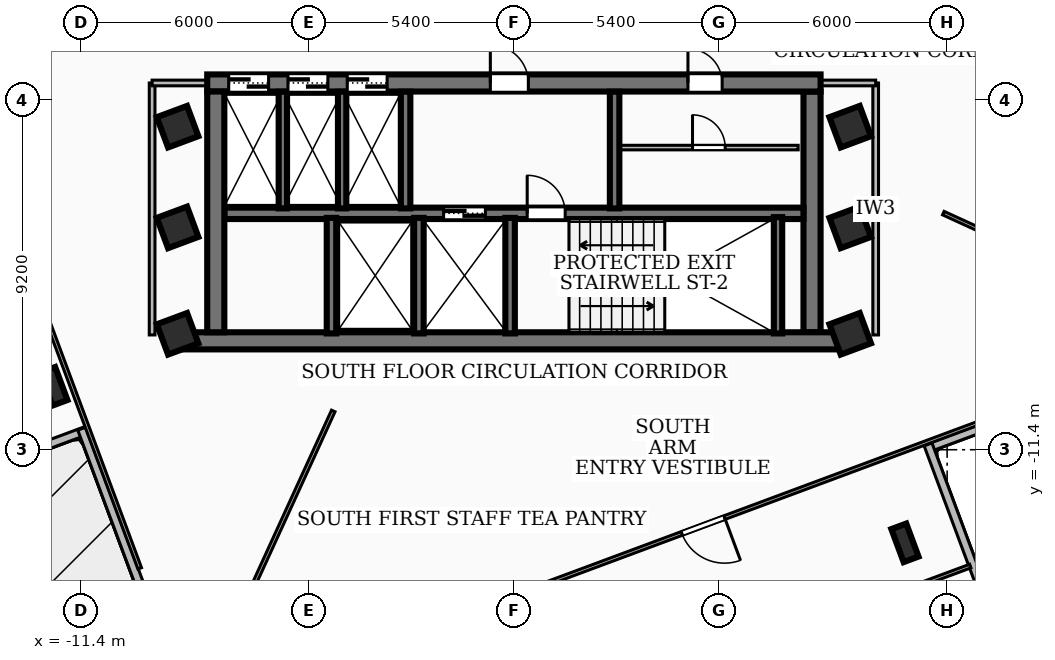
"""IFC4 building model, lengths in metres.
Left out: names, types, materials, properties, quantities, classifications, styles, units other than length and angle.
Written with IfcOpenShell. Run it as: python <this file> out.ifc"""

import sys

from ifc_helpers import new_model, si_unit, direction, frame, frame_2d, origin, origin_2d, place, context, subcontext, project, spatial, rectangle, i_section, extrude, element, fill, save


model = new_model("IFC4")
c1 = context("Model", 3, precision=1e-05, world=origin(), true_north=direction((0.0, 1.0)))
c2 = subcontext(c1, "Body", "Model", "MODEL_VIEW")
j1 = project(units=[si_unit("LENGTHUNIT", "METRE"), si_unit("PLANEANGLEUNIT", "RADIAN")], contexts=[c1])
p1 = place(None, origin())
s1 = spatial("IfcSite", under=j1, at=p1, CompositionType="ELEMENT")
p2 = place(p1, origin())
s2 = spatial("IfcBuilding", under=s1, at=p2, CompositionType="ELEMENT")
p3 = place(p2, frame((0.0, 0.0, 170.28)))
s3 = spatial("IfcBuildingStorey", under=s2, at=p3, CompositionType="ELEMENT", Elevation=170.28)
p4 = place(p3, frame((8.78, -8.535, 0.0), z_axis=(0.0, 0.0, 1.0), x_axis=(-1.0, 0.0, 0.0)))
e1 = element("IfcWall", 1, at=p4, inside=s3, PredefinedType="SHEAR", context=c2, shape_type="SweptSolid", body=[
    extrude(rectangle(XDim=17.56, YDim=0.45, at=frame_2d((8.78, 0.0))), origin(), (0.0, 0.0, 1.0), 3.34),
])
p5 = place(p3, frame((-8.07, -1.75, 0.0), z_axis=(0.0, 0.0, 1.0), x_axis=(1.0, 0.0, 0.0)))
e2 = element("IfcWall", 2, at=p5, inside=s3, PredefinedType="SHEAR", context=c2, shape_type="SweptSolid", body=[
    extrude(rectangle(XDim=16.14, YDim=0.45, at=frame_2d((8.07, 0.0))), origin(), (0.0, 0.0, 1.0), 3.34),
])
p6 = place(p5, frame((7.45, 0.0, 0.0)))
e3 = element("IfcOpeningElement", 3, at=p6, cuts=e2, PredefinedType="OPENING", context=c2, shape_type="SweptSolid", body=[
    extrude(rectangle(XDim=1.0, YDim=2.1, at=frame_2d((0.5, 1.05))), frame((0.0, 0.235, 0.0), z_axis=(0.0, -1.0, 0.0), x_axis=(1.0, 0.0, 0.0)), (0.0, 0.0, 1.0), 0.47),
])
p7 = place(p5, frame((12.65, 0.0, 0.0)))
e4 = element("IfcOpeningElement", 4, at=p7, cuts=e2, PredefinedType="OPENING", context=c2, shape_type="SweptSolid", body=[
    extrude(rectangle(XDim=0.9, YDim=2.06, at=frame_2d((0.45, 1.03))), frame((0.0, 0.235, 0.0), z_axis=(0.0, -1.0, 0.0), x_axis=(1.0, 0.0, 0.0)), (0.0, 0.0, 1.0), 0.47),
])
p8 = place(p5, frame((0.565, 0.0, 0.0)))
e5 = element("IfcOpeningElement", 5, at=p8, cuts=e2, PredefinedType="OPENING", context=c2, shape_type="SweptSolid", body=[
    extrude(rectangle(XDim=1.05, YDim=2.15, at=frame_2d((0.525, 1.075))), frame((0.0, 0.235, 0.0), z_axis=(0.0, -1.0, 0.0), x_axis=(1.0, 0.0, 0.0)), (0.0, 0.0, 1.0), 0.47),
])
p9 = place(p5, frame((2.125, 0.0, 0.0)))
e6 = element("IfcOpeningElement", 6, at=p9, cuts=e2, PredefinedType="OPENING", context=c2, shape_type="SweptSolid", body=[
    extrude(rectangle(XDim=1.05, YDim=2.15, at=frame_2d((0.525, 1.075))), frame((0.0, 0.235, 0.0), z_axis=(0.0, -1.0, 0.0), x_axis=(1.0, 0.0, 0.0)), (0.0, 0.0, 1.0), 0.47),
])
p10 = place(p5, frame((3.685, 0.0, 0.0)))
e7 = element("IfcOpeningElement", 7, at=p10, cuts=e2, PredefinedType="OPENING", context=c2, shape_type="SweptSolid", body=[
    extrude(rectangle(XDim=1.05, YDim=2.15, at=frame_2d((0.525, 1.075))), frame((0.0, 0.235, 0.0), z_axis=(0.0, -1.0, 0.0), x_axis=(1.0, 0.0, 0.0)), (0.0, 0.0, 1.0), 0.47),
])
for number, where, z_axis, x_axis in (
    (8, (-7.845, -8.31, 0.0), (0.0, 0.0, 1.0), (0.0, 1.0, 0.0)),
    (9, (7.845, -1.975, 0.0), (0.0, 0.0, 1.0), (0.0, -1.0, 0.0)),
):
    element("IfcWall", number, at=place(p3, frame(where, z_axis=z_axis, x_axis=x_axis)), inside=s3, PredefinedType="SHEAR", context=c2, shape_type="SweptSolid", body=[
        extrude(rectangle(XDim=6.335, YDim=0.45, at=frame_2d((3.167, 0.0))), origin(), (0.0, 0.0, 1.0), 3.34),
    ])
p11 = place(p3, frame((-7.62, -5.18, 0.0), z_axis=(0.0, 0.0, 1.0), x_axis=(1.0, 0.0, 0.0)))
e10 = element("IfcWall", 10, at=p11, inside=s3, PredefinedType="SOLIDWALL", context=c2, shape_type="SweptSolid", body=[
    extrude(rectangle(XDim=15.24, YDim=0.3, at=frame_2d((7.62, 0.0))), origin(), (0.0, 0.0, 1.0), 3.34),
])
p12 = place(p11, frame((5.77, 0.0, 0.0)))
e11 = element("IfcOpeningElement", 11, at=p12, cuts=e10, PredefinedType="OPENING", context=c2, shape_type="SweptSolid", body=[
    extrude(rectangle(XDim=1.1, YDim=2.15, at=frame_2d((0.55, 1.075))), frame((0.0, 0.16, 0.0), z_axis=(0.0, -1.0, 0.0), x_axis=(1.0, 0.0, 0.0)), (0.0, 0.0, 1.0), 0.32),
])
p13 = place(p11, frame((7.97, 0.0, 0.0)))
e12 = element("IfcOpeningElement", 12, at=p13, cuts=e10, PredefinedType="OPENING", context=c2, shape_type="SweptSolid", body=[
    extrude(rectangle(XDim=1.0, YDim=2.1, at=frame_2d((0.5, 1.05))), frame((0.0, 0.16, 0.0), z_axis=(0.0, -1.0, 0.0), x_axis=(1.0, 0.0, 0.0)), (0.0, 0.0, 1.0), 0.32),
])
p14 = place(p3, frame((6.95, -8.34, 0.0), z_axis=(0.0, 0.0, 1.0), x_axis=(0.0, 1.0, 0.0)))
e13 = element("IfcWall", 13, at=p14, inside=s3, PredefinedType="SOLIDWALL", context=c2, shape_type="SweptSolid", body=[
    extrude(rectangle(XDim=3.06, YDim=0.22, at=frame_2d((1.53, 0.0))), origin(), (0.0, 0.0, 1.0), 3.34),
])
for number, where, z_axis, x_axis in (
    (14, (-0.1, -8.34, 0.0), (0.0, 0.0, 1.0), (0.0, 1.0, 0.0)),
    (15, (-2.5, -8.34, 0.0), (0.0, 0.0, 1.0), (0.0, 1.0, 0.0)),
    (16, (-4.8, -8.34, 0.0), (0.0, 0.0, 1.0), (0.0, 1.0, 0.0)),
):
    element("IfcWall", number, at=place(p3, frame(where, z_axis=z_axis, x_axis=x_axis)), inside=s3, PredefinedType="SOLIDWALL", context=c2, shape_type="SweptSolid", body=[
        extrude(rectangle(XDim=3.04, YDim=0.25, at=frame_2d((1.52, 0.0))), origin(), (0.0, 0.0, 1.0), 3.34),
    ])
for number, where, z_axis, x_axis in (
    (17, (-2.85, -5.05, 0.0), (0.0, 0.0, 1.0), (0.0, 1.0, 0.0)),
    (18, (2.65, -5.05, 0.0), (0.0, 0.0, 1.0), (0.0, 1.0, 0.0)),
):
    element("IfcWall", number, at=place(p3, frame(where, z_axis=z_axis, x_axis=x_axis)), inside=s3, PredefinedType="SOLIDWALL", context=c2, shape_type="SweptSolid", body=[
        extrude(rectangle(XDim=3.07, YDim=0.25, at=frame_2d((1.535, 0.0))), origin(), (0.0, 0.0, 1.0), 3.34),
    ])
for number, where, z_axis, x_axis in (
    (19, (-6.08, -5.05, 0.0), (0.0, 0.0, 1.0), (0.0, 1.0, 0.0)),
    (20, (-4.52, -5.05, 0.0), (0.0, 0.0, 1.0), (0.0, 1.0, 0.0)),
):
    element("IfcWall", number, at=place(p3, frame(where, z_axis=z_axis, x_axis=x_axis)), inside=s3, PredefinedType="SOLIDWALL", context=c2, shape_type="SweptSolid", body=[
        extrude(rectangle(XDim=3.07, YDim=0.22, at=frame_2d((1.535, 0.0))), origin(), (0.0, 0.0, 1.0), 3.34),
    ])
for number, where, z_axis, x_axis in (
    (21, (-8.85, -5.55, 0.0), (0.0, 0.0, 1.0), (0.937, 0.349, 0.0)),
    (22, (-8.85, -2.9, 0.0), (0.0, 0.0, 1.0), (0.937, 0.349, 0.0)),
    (23, (8.85, -5.55, 0.0), (0.0, 0.0, 1.0), (0.937, 0.349, 0.0)),
    (24, (8.85, -2.9, 0.0), (0.0, 0.0, 1.0), (0.937, 0.349, 0.0)),
    (25, (8.85, -8.35, 0.0), (0.0, 0.0, 1.0), (0.937, 0.349, 0.0)),
    (26, (-8.85, -8.35, 0.0), (0.0, 0.0, 1.0), (0.937, 0.349, 0.0)),
):
    element("IfcColumn", number, at=place(p3, frame(where, z_axis=z_axis, x_axis=x_axis)), inside=s3, PredefinedType="COLUMN", context=c2, shape_type="SweptSolid", body=[
        extrude(rectangle(XDim=0.85, YDim=0.85, at=origin_2d()), origin(), (0.0, 0.0, 1.0), 3.6),
    ])
for number, where, z_axis, x_axis in (
    (27, (-12.106, -9.731, 0.0), (0.0, 0.0, 1.0), (0.937, 0.349, 0.0)),
    (28, (10.29, -13.85, 0.0), (0.0, 0.0, 1.0), (0.937, 0.349, 0.0)),
):
    element("IfcColumn", number, at=place(p3, frame(where, z_axis=z_axis, x_axis=x_axis)), inside=s3, PredefinedType="COLUMN", context=c2, shape_type="SweptSolid", body=[
        extrude(i_section(OverallWidth=0.418, OverallDepth=0.927, WebThickness=0.019, FlangeThickness=0.032, at=origin_2d()), origin(), (0.0, 0.0, 1.0), 3.6),
    ])
p15 = place(p3, frame((-11.26, -10.898, 0.0), z_axis=(0.0, 0.0, 1.0), x_axis=(-0.937248687931, -0.348661579431, 0.0)))
e29 = element("IfcWall", 29, at=p15, inside=s3, PredefinedType="SOLIDWALL", context=c2, shape_type="SweptSolid", body=[
    extrude(rectangle(XDim=9.057, YDim=0.22, at=frame_2d((4.529, 0.0))), origin(), (0.0, 0.0, 1.0), 2.72),
])
p16 = place(p15, frame((4.4, 0.0, 0.0)))
e30 = element("IfcOpeningElement", 30, at=p16, cuts=e29, PredefinedType="OPENING", context=c2, shape_type="SweptSolid", body=[
    extrude(rectangle(XDim=1.1, YDim=2.1, at=frame_2d((0.55, 1.05))), frame((0.0, 0.12, 0.0), z_axis=(0.0, -1.0, 0.0), x_axis=(1.0, 0.0, 0.0)), (0.0, 0.0, 1.0), 0.24),
])
p17 = place(p3, frame((17.181, -9.016, 0.0), z_axis=(0.0, 0.0, 1.0), x_axis=(-0.937216908499, -0.34874699486, 0.0)))
e31 = element("IfcWall", 31, at=p17, inside=s3, PredefinedType="SOLIDWALL", context=c2, shape_type="SweptSolid", body=[
    extrude(rectangle(XDim=6.758, YDim=0.22, at=frame_2d((3.379, 0.0))), origin(), (0.0, 0.0, 1.0), 3.34),
])
p18 = place(p3, frame((10.898, -11.26, 0.0), z_axis=(0.0, 0.0, 1.0), x_axis=(0.348636078187, -0.937258174137, 0.0)))
e32 = element("IfcWall", 32, at=p18, inside=s3, PredefinedType="SOLIDWALL", context=c2, shape_type="SweptSolid", body=[
    extrude(rectangle(XDim=7.458, YDim=0.22, at=frame_2d((3.729, 0.0))), origin(), (0.0, 0.0, 1.0), 3.34),
])
p19 = place(p3, frame((-9.016, -17.181, 0.0), z_axis=(0.0, 0.0, 1.0), x_axis=(-0.34874699486, 0.937216908499, 0.0)))
e33 = element("IfcWall", 33, at=p19, inside=s3, PredefinedType="SOLIDWALL", context=c2, shape_type="SweptSolid", body=[
    extrude(rectangle(XDim=6.758, YDim=0.22, at=frame_2d((3.379, 0.0))), origin(), (0.0, 0.0, 1.0), 2.72),
])
p20 = place(p3, frame((2.8, -3.45, 0.0), z_axis=(0.0, 0.0, 1.0), x_axis=(1.0, 0.0, 0.0)))
e34 = element("IfcWall", 34, at=p20, inside=s3, PredefinedType="PARTITIONING", context=c2, shape_type="SweptSolid", body=[
    extrude(rectangle(XDim=4.68, YDim=0.12, at=frame_2d((2.34, 0.0))), origin(), (0.0, 0.0, 1.0), 3.34),
])
p21 = place(p20, frame((1.9, 0.0, 0.0)))
e35 = element("IfcOpeningElement", 35, at=p21, cuts=e34, PredefinedType="OPENING", context=c2, shape_type="SweptSolid", body=[
    extrude(rectangle(XDim=0.86, YDim=2.04, at=frame_2d((0.43, 1.02))), frame((0.0, 0.07, 0.0), z_axis=(0.0, -1.0, 0.0), x_axis=(1.0, 0.0, 0.0)), (0.0, 0.0, 1.0), 0.14),
])
p22 = place(p3, frame((-9.52, -8.38, 0.0), z_axis=(0.0, 0.0, 1.0), x_axis=(0.0, 1.0, 0.0)))
e36 = element("IfcWall", 36, at=p22, inside=s3, PredefinedType="PARTITIONING", context=c2, shape_type="SweptSolid", body=[
    extrude(rectangle(XDim=6.63, YDim=0.15, at=frame_2d((3.315, 0.0))), origin(), (0.0, 0.0, 1.0), 2.644),
])
p23 = place(p3, frame((-7.85, -1.75, 0.0), z_axis=(0.0, 0.0, 1.0), x_axis=(-1.0, 0.0, 0.0)))
e37 = element("IfcWall", 37, at=p23, inside=s3, PredefinedType="PARTITIONING", context=c2, shape_type="SweptSolid", body=[
    extrude(rectangle(XDim=1.67, YDim=0.15, at=frame_2d((0.835, 0.0))), origin(), (0.0, 0.0, 1.0), 2.57),
])
p24 = place(p3, frame((9.52, -8.38, 0.0), z_axis=(0.0, 0.0, 1.0), x_axis=(0.0, 1.0, 0.0)))
e38 = element("IfcWall", 38, at=p24, inside=s3, PredefinedType="PARTITIONING", context=c2, shape_type="SweptSolid", body=[
    extrude(rectangle(XDim=6.63, YDim=0.15, at=frame_2d((3.315, 0.0))), origin(), (0.0, 0.0, 1.0), 3.34),
])
p25 = place(p3, frame((7.85, -1.75, 0.0), z_axis=(0.0, 0.0, 1.0), x_axis=(1.0, 0.0, 0.0)))
e39 = element("IfcWall", 39, at=p25, inside=s3, PredefinedType="PARTITIONING", context=c2, shape_type="SweptSolid", body=[
    extrude(rectangle(XDim=1.67, YDim=0.15, at=frame_2d((0.835, 0.0))), origin(), (0.0, 0.0, 1.0), 2.57),
])
p26 = place(p3, frame((-4.753, -10.38, 0.0), z_axis=(0.0, 0.0, 1.0), x_axis=(-0.416191484634, -0.909276991966, 0.0)))
e40 = element("IfcWall", 40, at=p26, inside=s3, PredefinedType="PARTITIONING", context=c2, shape_type="SweptSolid", body=[
    extrude(rectangle(XDim=8.258, YDim=0.1, at=frame_2d((4.129, 0.0))), origin(), (0.0, 0.0, 1.0), 2.644),
])
p27 = place(p3, frame((11.3, -5.174, 0.0), z_axis=(0.0, 0.0, 1.0), x_axis=(0.909275268701, -0.416195249528, 0.0)))
e41 = element("IfcWall", 41, at=p27, inside=s3, PredefinedType="PARTITIONING", context=c2, shape_type="SweptSolid", body=[
    extrude(rectangle(XDim=7.246, YDim=0.1, at=frame_2d((3.623, 0.0))), origin(), (0.0, 0.0, 1.0), 3.34),
])
p28 = place(p3, frame((9.846, 14.522, 0.0), z_axis=(0.0, 0.0, 1.0), x_axis=(0.348543090668, -0.937292757866, 0.0)))
e42 = element("IfcWall", 42, at=p28, inside=s3, PredefinedType="PARTITIONING", context=c2, shape_type="SweptSolid", body=[
    extrude(rectangle(XDim=20.198, YDim=0.1, at=frame_2d((10.099, 0.0))), origin(), (0.0, 0.0, 1.0), 2.644),
])
p29 = place(p28, frame((9.579, 0.0, 0.0)))
e43 = element("IfcOpeningElement", 43, at=p29, cuts=e42, PredefinedType="OPENING", context=c2, shape_type="SweptSolid", body=[
    extrude(rectangle(XDim=1.2, YDim=2.1, at=frame_2d((0.6, 1.05))), frame((0.0, 0.06, 0.0), z_axis=(0.0, -1.0, 0.0), x_axis=(1.0, 0.0, 0.0)), (0.0, 0.0, 1.0), 0.12),
])
p30 = place(p3, frame((-9.846, -14.522, 0.0), z_axis=(0.0, 0.0, 1.0), x_axis=(-0.348543090668, 0.937292757866, 0.0)))
e44 = element("IfcWall", 44, at=p30, inside=s3, PredefinedType="PARTITIONING", context=c2, shape_type="SweptSolid", body=[
    extrude(rectangle(XDim=20.198, YDim=0.1, at=frame_2d((10.099, 0.0))), origin(), (0.0, 0.0, 1.0), 2.644),
])
p31 = place(p30, frame((9.579, 0.0, 0.0)))
e45 = element("IfcOpeningElement", 45, at=p31, cuts=e44, PredefinedType="OPENING", context=c2, shape_type="SweptSolid", body=[
    extrude(rectangle(XDim=1.2, YDim=2.1, at=frame_2d((0.6, 1.05))), frame((0.0, 0.06, 0.0), z_axis=(0.0, -1.0, 0.0), x_axis=(1.0, 0.0, 0.0)), (0.0, 0.0, 1.0), 0.12),
])
p32 = place(p3, frame((14.522, -9.846, 0.0), z_axis=(0.0, 0.0, 1.0), x_axis=(-0.937292757866, -0.348543090668, 0.0)))
e46 = element("IfcWall", 46, at=p32, inside=s3, PredefinedType="PARTITIONING", context=c2, shape_type="SweptSolid", body=[
    extrude(rectangle(XDim=20.198, YDim=0.1, at=frame_2d((10.099, 0.0))), origin(), (0.0, 0.0, 1.0), 2.644),
])
p33 = place(p32, frame((9.579, 0.0, 0.0)))
e47 = element("IfcOpeningElement", 47, at=p33, cuts=e46, PredefinedType="OPENING", context=c2, shape_type="SweptSolid", body=[
    extrude(rectangle(XDim=1.2, YDim=2.1, at=frame_2d((0.6, 1.05))), frame((0.0, 0.06, 0.0), z_axis=(0.0, -1.0, 0.0), x_axis=(1.0, 0.0, 0.0)), (0.0, 0.0, 1.0), 0.12),
])
p34 = place(p3, frame((12.009, -14.461, 0.0), z_axis=(0.0, 0.0, 1.0), x_axis=(-0.937262231235, -0.348625171066, 0.0)))
e48 = element("IfcWall", 48, at=p34, inside=s3, PredefinedType="PARTITIONING", context=c2, shape_type="SweptSolid", body=[
    extrude(rectangle(XDim=12.59, YDim=0.1, at=frame_2d((6.295, 0.0))), origin(), (0.0, 0.0, 1.0), 2.644),
])
p35 = place(p34, frame((5.69, 0.0, 0.0)))
e49 = element("IfcOpeningElement", 49, at=p35, cuts=e48, PredefinedType="OPENING", context=c2, shape_type="SweptSolid", body=[
    extrude(rectangle(XDim=1.05, YDim=2.08, at=frame_2d((0.525, 1.04))), frame((0.0, 0.06, 0.0), z_axis=(0.0, -1.0, 0.0), x_axis=(1.0, 0.0, 0.0)), (0.0, 0.0, 1.0), 0.12),
])
p36 = place(p6, origin())
e50 = element("IfcDoor", 50, at=p36, inside=s3, OperationType="SINGLE_SWING_LEFT", PredefinedType="DOOR", context=c2, shape_type="SweptSolid", body=[
    extrude(rectangle(XDim=1.0, YDim=2.1, at=frame_2d((0.5, 1.05))), frame((0.0, 0.025, 0.0), z_axis=(0.0, -1.0, 0.0), x_axis=(1.0, 0.0, 0.0)), (0.0, 0.0, 1.0), 0.05),
])
fill(e3, e50)
p37 = place(p12, origin())
e51 = element("IfcDoor", 51, at=p37, inside=s3, OperationType="DOUBLE_DOOR_SLIDING", PredefinedType="DOOR", context=c2, shape_type="SweptSolid", body=[
    extrude(rectangle(XDim=1.1, YDim=2.15, at=frame_2d((0.55, 1.075))), frame((0.0, 0.025, 0.0), z_axis=(0.0, -1.0, 0.0), x_axis=(1.0, 0.0, 0.0)), (0.0, 0.0, 1.0), 0.05),
])
fill(e11, e51)
p38 = place(p13, origin())
e52 = element("IfcDoor", 52, at=p38, inside=s3, OperationType="SINGLE_SWING_LEFT", PredefinedType="DOOR", context=c2, shape_type="SweptSolid", body=[
    extrude(rectangle(XDim=1.0, YDim=2.1, at=frame_2d((0.5, 1.05))), frame((0.0, 0.025, 0.0), z_axis=(0.0, -1.0, 0.0), x_axis=(1.0, 0.0, 0.0)), (0.0, 0.0, 1.0), 0.05),
])
fill(e12, e52)
p39 = place(p7, origin())
e53 = element("IfcDoor", 53, at=p39, inside=s3, OperationType="SINGLE_SWING_LEFT", PredefinedType="DOOR", context=c2, shape_type="SweptSolid", body=[
    extrude(rectangle(XDim=0.9, YDim=2.06, at=frame_2d((0.45, 1.03))), frame((0.0, 0.025, 0.0), z_axis=(0.0, -1.0, 0.0), x_axis=(1.0, 0.0, 0.0)), (0.0, 0.0, 1.0), 0.05),
])
fill(e4, e53)
p40 = place(p8, origin())
e54 = element("IfcDoor", 54, at=p40, inside=s3, OperationType="DOUBLE_DOOR_SLIDING", PredefinedType="DOOR", context=c2, shape_type="SweptSolid", body=[
    extrude(rectangle(XDim=1.05, YDim=2.15, at=frame_2d((0.525, 1.075))), frame((0.0, 0.025, 0.0), z_axis=(0.0, -1.0, 0.0), x_axis=(1.0, 0.0, 0.0)), (0.0, 0.0, 1.0), 0.05),
])
fill(e5, e54)
p41 = place(p9, origin())
e55 = element("IfcDoor", 55, at=p41, inside=s3, OperationType="DOUBLE_DOOR_SLIDING", PredefinedType="DOOR", context=c2, shape_type="SweptSolid", body=[
    extrude(rectangle(XDim=1.05, YDim=2.15, at=frame_2d((0.525, 1.075))), frame((0.0, 0.025, 0.0), z_axis=(0.0, -1.0, 0.0), x_axis=(1.0, 0.0, 0.0)), (0.0, 0.0, 1.0), 0.05),
])
fill(e6, e55)
p42 = place(p10, origin())
e56 = element("IfcDoor", 56, at=p42, inside=s3, OperationType="DOUBLE_DOOR_SLIDING", PredefinedType="DOOR", context=c2, shape_type="SweptSolid", body=[
    extrude(rectangle(XDim=1.05, YDim=2.15, at=frame_2d((0.525, 1.075))), frame((0.0, 0.025, 0.0), z_axis=(0.0, -1.0, 0.0), x_axis=(1.0, 0.0, 0.0)), (0.0, 0.0, 1.0), 0.05),
])
fill(e7, e56)
p43 = place(p21, origin())
e57 = element("IfcDoor", 57, at=p43, inside=s3, OperationType="SINGLE_SWING_LEFT", PredefinedType="DOOR", context=c2, shape_type="SweptSolid", body=[
    extrude(rectangle(XDim=0.86, YDim=2.04, at=frame_2d((0.43, 1.02))), frame((0.0, 0.025, 0.0), z_axis=(0.0, -1.0, 0.0), x_axis=(1.0, 0.0, 0.0)), (0.0, 0.0, 1.0), 0.05),
])
fill(e35, e57)
p44 = place(p33, origin())
e58 = element("IfcDoor", 58, at=p44, inside=s3, OperationType="SINGLE_SWING_LEFT", PredefinedType="DOOR", context=c2, shape_type="SweptSolid", body=[
    extrude(rectangle(XDim=1.2, YDim=2.1, at=frame_2d((0.6, 1.05))), frame((0.0, 0.025, 0.0), z_axis=(0.0, -1.0, 0.0), x_axis=(1.0, 0.0, 0.0)), (0.0, 0.0, 1.0), 0.05),
])
fill(e47, e58)
save(model, sys.argv[1])
